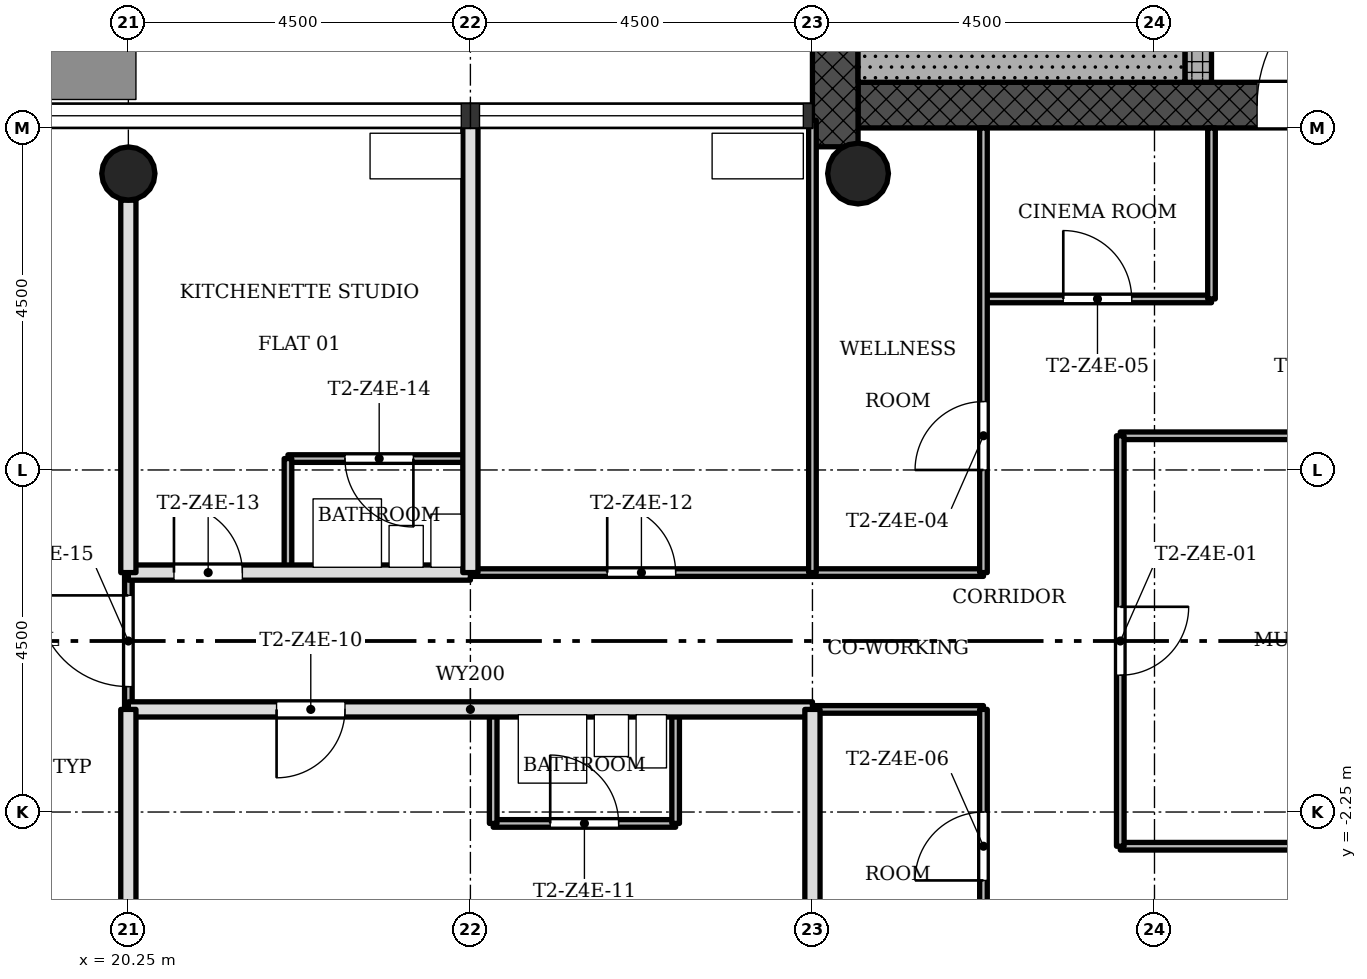
"""IFC4 building model, lengths in metres.
Left out: names, types, materials, properties, quantities, classifications, styles, units other than length and angle.
Written with IfcOpenShell. Run it as: python <this file> out.ifc"""

import sys

from ifc_helpers import new_model, si_unit, direction, frame, frame_2d, origin, origin_2d, place, context, subcontext, project, spatial, rectangle, hollow_circle, extrude, element, fill, save


model = new_model("IFC4")
c1 = context("Model", 3, precision=1e-05, world=origin(), true_north=direction((0.0, 1.0)))
c2 = subcontext(c1, "Body", "Model", "MODEL_VIEW")
j1 = project(units=[si_unit("LENGTHUNIT", "METRE"), si_unit("PLANEANGLEUNIT", "RADIAN")], contexts=[c1])
p1 = place(None, origin())
s1 = spatial("IfcSite", under=j1, at=p1, CompositionType="ELEMENT")
p2 = place(p1, origin())
s2 = spatial("IfcBuilding", under=s1, at=p2, CompositionType="ELEMENT")
p3 = place(p2, frame((0.0, 0.0, 209.6)))
s3 = spatial("IfcBuildingStorey", under=s2, at=p3, CompositionType="ELEMENT", Elevation=209.6)
p4 = place(p3, frame((29.85, 7.05, 0.0), z_axis=(0.0, 0.0, 1.0), x_axis=(1.0, 0.0, 0.0)))
e1 = element("IfcWall", 1, at=p4, inside=s3, PredefinedType="SHEAR", context=c2, shape_type="SweptSolid", body=[
    extrude(rectangle(XDim=12.9, YDim=0.6, at=frame_2d((6.45, 0.0))), origin(), (0.0, 0.0, 1.0), 3.4),
])
p5 = place(p4, frame((5.25, 0.0, 0.0)))
e2 = element("IfcOpeningElement", 2, at=p5, cuts=e1, PredefinedType="OPENING", context=c2, shape_type="SweptSolid", body=[
    extrude(rectangle(XDim=1.8, YDim=2.1, at=frame_2d((0.9, 1.05))), frame((0.0, 0.31, 0.0), z_axis=(0.0, -1.0, 0.0), x_axis=(1.0, 0.0, 0.0)), (0.0, 0.0, 1.0), 0.62),
])
p6 = place(p3, frame((29.55, 15.15, 0.0), z_axis=(0.0, 0.0, 1.0), x_axis=(0.0, -1.0, 0.0)))
e3 = element("IfcWall", 3, at=p6, inside=s3, PredefinedType="SHEAR", context=c2, shape_type="SweptSolid", body=[
    extrude(rectangle(XDim=8.648, YDim=0.6, at=frame_2d((4.324, 0.0))), origin(), (0.0, 0.0, 1.0), 3.4),
])
p7 = place(p3, frame((34.325, 7.35, 0.0), z_axis=(0.0, 0.0, 1.0), x_axis=(0.0, 1.0, 0.0)))
e4 = element("IfcWall", 4, at=p7, inside=s3, PredefinedType="SHEAR", context=c2, shape_type="SweptSolid", body=[
    extrude(rectangle(XDim=7.8, YDim=0.35, at=frame_2d((3.9, 0.0))), origin(), (0.0, 0.0, 1.0), 3.4),
])
p8 = place(p7, frame((1.05, 0.0, 0.0)))
e5 = element("IfcOpeningElement", 5, at=p8, cuts=e4, PredefinedType="OPENING", context=c2, shape_type="SweptSolid", body=[
    extrude(rectangle(XDim=0.9, YDim=2.1, at=frame_2d((0.45, 1.05))), frame((0.0, 0.185, 0.0), z_axis=(0.0, -1.0, 0.0), x_axis=(1.0, 0.0, 0.0)), (0.0, 0.0, 1.0), 0.37),
])
p9 = place(p3, frame((20.25, 6.15, 0.0), z_axis=(0.0, 0.0, 1.0), x_axis=(1.0, 0.0, 0.0)))
e6 = element("IfcColumn", 6, at=p9, inside=s3, PredefinedType="COLUMN", context=c2, shape_type="SweptSolid", body=[
    extrude(hollow_circle(Radius=0.35, WallThickness=0.025, at=origin_2d()), origin(), (0.0, 0.0, 1.0), 3.4),
])
p10 = place(p3, frame((29.85, 6.15, 0.0), z_axis=(0.0, 0.0, 1.0), x_axis=(1.0, 0.0, 0.0)))
e7 = element("IfcColumn", 7, at=p10, inside=s3, PredefinedType="COLUMN", context=c2, shape_type="SweptSolid", body=[
    extrude(hollow_circle(Radius=0.4, WallThickness=0.028, at=origin_2d()), origin(), (0.0, 0.0, 1.0), 3.4),
])
p11 = place(p3, frame((38.7, -2.7, 0.0), z_axis=(0.0, 0.0, 1.0), x_axis=(-1.0, 0.0, 0.0)))
e8 = element("IfcWall", 8, at=p11, inside=s3, PredefinedType="PARTITIONING", context=c2, shape_type="SweptSolid", body=[
    extrude(rectangle(XDim=5.4, YDim=0.1, at=frame_2d((2.7, 0.0))), origin(), (0.0, 0.0, 1.0), 3.0),
])
p12 = place(p3, frame((27.45, -2.4, 0.0), z_axis=(0.0, 0.0, 1.0), x_axis=(-1.0, 0.0, 0.0)))
e9 = element("IfcWall", 9, at=p12, inside=s3, PredefinedType="PARTITIONING", context=c2, shape_type="SweptSolid", body=[
    extrude(rectangle(XDim=2.4, YDim=0.1, at=frame_2d((1.2, 0.0))), origin(), (0.0, 0.0, 1.0), 3.0),
])
p13 = place(p12, frame((0.75, 0.0, 0.0)))
e10 = element("IfcOpeningElement", 10, at=p13, cuts=e9, PredefinedType="OPENING", context=c2, shape_type="SweptSolid", body=[
    extrude(rectangle(XDim=0.9, YDim=2.1, at=frame_2d((0.45, 1.05))), frame((0.0, 0.06, 0.0), z_axis=(0.0, -1.0, 0.0), x_axis=(1.0, 0.0, 0.0)), (0.0, 0.0, 1.0), 0.12),
])
p14 = place(p3, frame((31.5, -0.9, 0.0), z_axis=(0.0, 0.0, 1.0), x_axis=(-1.0, 0.0, 0.0)))
e11 = element("IfcWall", 11, at=p14, inside=s3, PredefinedType="PARTITIONING", context=c2, shape_type="SweptSolid", body=[
    extrude(rectangle(XDim=2.25, YDim=0.1, at=frame_2d((1.125, 0.0))), origin(), (0.0, 0.0, 1.0), 3.0),
])
p15 = place(p3, frame((29.25, -0.9, 0.0), z_axis=(0.0, 0.0, 1.0), x_axis=(-1.0, 0.0, 0.0)))
e12 = element("IfcWall", 12, at=p15, inside=s3, PredefinedType="SOLIDWALL", context=c2, shape_type="SweptSolid", body=[
    extrude(rectangle(XDim=9.0, YDim=0.2, at=frame_2d((4.5, 0.0))), origin(), (0.0, 0.0, 1.0), 3.0),
])
p16 = place(p15, frame((6.15, 0.0, 0.0)))
e13 = element("IfcOpeningElement", 13, at=p16, cuts=e12, PredefinedType="OPENING", context=c2, shape_type="SweptSolid", body=[
    extrude(rectangle(XDim=0.9, YDim=2.1, at=frame_2d((0.45, 1.05))), frame((0.0, 0.11, 0.0), z_axis=(0.0, -1.0, 0.0), x_axis=(1.0, 0.0, 0.0)), (0.0, 0.0, 1.0), 0.22),
])
p17 = place(p3, frame((31.5, 0.9, 0.0), z_axis=(0.0, 0.0, 1.0), x_axis=(-1.0, 0.0, 0.0)))
e14 = element("IfcWall", 14, at=p17, inside=s3, PredefinedType="PARTITIONING", context=c2, shape_type="SweptSolid", body=[
    extrude(rectangle(XDim=6.75, YDim=0.1, at=frame_2d((3.375, 0.0))), origin(), (0.0, 0.0, 1.0), 3.0),
])
p18 = place(p17, frame((4.05, 0.0, 0.0)))
e15 = element("IfcOpeningElement", 15, at=p18, cuts=e14, PredefinedType="OPENING", context=c2, shape_type="SweptSolid", body=[
    extrude(rectangle(XDim=0.9, YDim=2.1, at=frame_2d((0.45, 1.05))), frame((0.0, 0.06, 0.0), z_axis=(0.0, -1.0, 0.0), x_axis=(1.0, 0.0, 0.0)), (0.0, 0.0, 1.0), 0.12),
])
p19 = place(p3, frame((24.75, 0.9, 0.0), z_axis=(0.0, 0.0, 1.0), x_axis=(-1.0, 0.0, 0.0)))
e16 = element("IfcWall", 16, at=p19, inside=s3, PredefinedType="SOLIDWALL", context=c2, shape_type="SweptSolid", body=[
    extrude(rectangle(XDim=4.5, YDim=0.2, at=frame_2d((2.25, 0.0))), origin(), (0.0, 0.0, 1.0), 3.0),
])
p20 = place(p19, frame((3.0, 0.0, 0.0)))
e17 = element("IfcOpeningElement", 17, at=p20, cuts=e16, PredefinedType="OPENING", context=c2, shape_type="SweptSolid", body=[
    extrude(rectangle(XDim=0.9, YDim=2.1, at=frame_2d((0.45, 1.05))), frame((0.0, 0.11, 0.0), z_axis=(0.0, -1.0, 0.0), x_axis=(1.0, 0.0, 0.0)), (0.0, 0.0, 1.0), 0.22),
])
p21 = place(p3, frame((24.75, 2.4, 0.0), z_axis=(0.0, 0.0, 1.0), x_axis=(-1.0, 0.0, 0.0)))
e18 = element("IfcWall", 18, at=p21, inside=s3, PredefinedType="PARTITIONING", context=c2, shape_type="SweptSolid", body=[
    extrude(rectangle(XDim=2.4, YDim=0.1, at=frame_2d((1.2, 0.0))), origin(), (0.0, 0.0, 1.0), 3.0),
])
p22 = place(p21, frame((0.75, 0.0, 0.0)))
e19 = element("IfcOpeningElement", 19, at=p22, cuts=e18, PredefinedType="OPENING", context=c2, shape_type="SweptSolid", body=[
    extrude(rectangle(XDim=0.9, YDim=2.1, at=frame_2d((0.45, 1.05))), frame((0.0, 0.06, 0.0), z_axis=(0.0, -1.0, 0.0), x_axis=(1.0, 0.0, 0.0)), (0.0, 0.0, 1.0), 0.12),
])
p23 = place(p3, frame((38.7, 2.7, 0.0), z_axis=(0.0, 0.0, 1.0), x_axis=(-1.0, 0.0, 0.0)))
e20 = element("IfcWall", 20, at=p23, inside=s3, PredefinedType="PARTITIONING", context=c2, shape_type="SweptSolid", body=[
    extrude(rectangle(XDim=5.4, YDim=0.1, at=frame_2d((2.7, 0.0))), origin(), (0.0, 0.0, 1.0), 3.0),
])
p24 = place(p23, frame((2.25, 0.0, 0.0)))
e21 = element("IfcOpeningElement", 21, at=p24, cuts=e20, PredefinedType="OPENING", context=c2, shape_type="SweptSolid", body=[
    extrude(rectangle(XDim=0.9, YDim=2.1, at=frame_2d((0.45, 1.05))), frame((0.0, 0.06, 0.0), z_axis=(0.0, -1.0, 0.0), x_axis=(1.0, 0.0, 0.0)), (0.0, 0.0, 1.0), 0.12),
])
p25 = place(p3, frame((34.5, 4.5, 0.0), z_axis=(0.0, 0.0, 1.0), x_axis=(-1.0, 0.0, 0.0)))
e22 = element("IfcWall", 22, at=p25, inside=s3, PredefinedType="PARTITIONING", context=c2, shape_type="SweptSolid", body=[
    extrude(rectangle(XDim=3.0, YDim=0.1, at=frame_2d((1.5, 0.0))), origin(), (0.0, 0.0, 1.0), 3.0),
])
p26 = place(p25, frame((1.05, 0.0, 0.0)))
e23 = element("IfcOpeningElement", 23, at=p26, cuts=e22, PredefinedType="OPENING", context=c2, shape_type="SweptSolid", body=[
    extrude(rectangle(XDim=0.9, YDim=2.1, at=frame_2d((0.45, 1.05))), frame((0.0, 0.06, 0.0), z_axis=(0.0, -1.0, 0.0), x_axis=(1.0, 0.0, 0.0)), (0.0, 0.0, 1.0), 0.12),
])
p27 = place(p3, frame((34.5, 4.5, 0.0), z_axis=(0.0, 0.0, 1.0), x_axis=(0.0, 1.0, 0.0)))
e24 = element("IfcWall", 24, at=p27, inside=s3, PredefinedType="PARTITIONING", context=c2, shape_type="SweptSolid", body=[
    extrude(rectangle(XDim=2.25, YDim=0.1, at=frame_2d((1.125, 0.0))), origin(), (0.0, 0.0, 1.0), 3.0),
])
p28 = place(p3, frame((33.3, -2.7, 0.0), z_axis=(0.0, 0.0, 1.0), x_axis=(0.0, 1.0, 0.0)))
e25 = element("IfcWall", 25, at=p28, inside=s3, PredefinedType="PARTITIONING", context=c2, shape_type="SweptSolid", body=[
    extrude(rectangle(XDim=5.4, YDim=0.1, at=frame_2d((2.7, 0.0))), origin(), (0.0, 0.0, 1.0), 3.0),
])
p29 = place(p28, frame((2.25, 0.0, 0.0)))
e26 = element("IfcOpeningElement", 26, at=p29, cuts=e25, PredefinedType="OPENING", context=c2, shape_type="SweptSolid", body=[
    extrude(rectangle(XDim=0.9, YDim=2.1, at=frame_2d((0.45, 1.05))), frame((0.0, 0.06, 0.0), z_axis=(0.0, -1.0, 0.0), x_axis=(1.0, 0.0, 0.0)), (0.0, 0.0, 1.0), 0.12),
])
p30 = place(p3, frame((31.5, -4.5, 0.0), z_axis=(0.0, 0.0, 1.0), x_axis=(0.0, 1.0, 0.0)))
e27 = element("IfcWall", 27, at=p30, inside=s3, PredefinedType="PARTITIONING", context=c2, shape_type="SweptSolid", body=[
    extrude(rectangle(XDim=3.6, YDim=0.1, at=frame_2d((1.8, 0.0))), origin(), (0.0, 0.0, 1.0), 3.0),
])
p31 = place(p30, frame((1.35, 0.0, 0.0)))
e28 = element("IfcOpeningElement", 28, at=p31, cuts=e27, PredefinedType="OPENING", context=c2, shape_type="SweptSolid", body=[
    extrude(rectangle(XDim=0.9, YDim=2.1, at=frame_2d((0.45, 1.05))), frame((0.0, 0.06, 0.0), z_axis=(0.0, -1.0, 0.0), x_axis=(1.0, 0.0, 0.0)), (0.0, 0.0, 1.0), 0.12),
])
p32 = place(p3, frame((31.5, 0.9, 0.0), z_axis=(0.0, 0.0, 1.0), x_axis=(0.0, 1.0, 0.0)))
e29 = element("IfcWall", 29, at=p32, inside=s3, PredefinedType="PARTITIONING", context=c2, shape_type="SweptSolid", body=[
    extrude(rectangle(XDim=5.85, YDim=0.1, at=frame_2d((2.925, 0.0))), origin(), (0.0, 0.0, 1.0), 3.0),
])
p33 = place(p32, frame((1.35, 0.0, 0.0)))
e30 = element("IfcOpeningElement", 30, at=p33, cuts=e29, PredefinedType="OPENING", context=c2, shape_type="SweptSolid", body=[
    extrude(rectangle(XDim=0.9, YDim=2.1, at=frame_2d((0.45, 1.05))), frame((0.0, 0.06, 0.0), z_axis=(0.0, -1.0, 0.0), x_axis=(1.0, 0.0, 0.0)), (0.0, 0.0, 1.0), 0.12),
])
p34 = place(p3, frame((29.25, 0.9, 0.0), z_axis=(0.0, 0.0, 1.0), x_axis=(0.0, 1.0, 0.0)))
e31 = element("IfcWall", 31, at=p34, inside=s3, PredefinedType="PARTITIONING", context=c2, shape_type="SweptSolid", body=[
    extrude(rectangle(XDim=5.95, YDim=0.1, at=frame_2d((2.975, 0.0))), origin(), (0.0, 0.0, 1.0), 3.0),
])
p35 = place(p3, frame((29.25, -6.85, 0.0), z_axis=(0.0, 0.0, 1.0), x_axis=(0.0, 1.0, 0.0)))
e32 = element("IfcWall", 32, at=p35, inside=s3, PredefinedType="SOLIDWALL", context=c2, shape_type="SweptSolid", body=[
    extrude(rectangle(XDim=5.95, YDim=0.2, at=frame_2d((2.975, 0.0))), origin(), (0.0, 0.0, 1.0), 3.0),
])
for number, where, z_axis, x_axis in (
    (33, (27.45, -2.4, 0.0), (0.0, 0.0, 1.0), (0.0, 1.0, 0.0)),
    (34, (25.05, -2.4, 0.0), (0.0, 0.0, 1.0), (0.0, 1.0, 0.0)),
):
    element("IfcWall", number, at=place(p3, frame(where, z_axis=z_axis, x_axis=x_axis)), inside=s3, PredefinedType="PARTITIONING", context=c2, shape_type="SweptSolid", body=[
        extrude(rectangle(XDim=1.5, YDim=0.1, at=frame_2d((0.75, 0.0))), origin(), (0.0, 0.0, 1.0), 3.0),
    ])
p36 = place(p3, frame((24.75, 0.9, 0.0), z_axis=(0.0, 0.0, 1.0), x_axis=(0.0, 1.0, 0.0)))
e35 = element("IfcWall", 35, at=p36, inside=s3, PredefinedType="SOLIDWALL", context=c2, shape_type="SweptSolid", body=[
    extrude(rectangle(XDim=5.95, YDim=0.2, at=frame_2d((2.975, 0.0))), origin(), (0.0, 0.0, 1.0), 3.0),
])
p37 = place(p3, frame((22.35, 0.9, 0.0), z_axis=(0.0, 0.0, 1.0), x_axis=(0.0, 1.0, 0.0)))
e36 = element("IfcWall", 36, at=p37, inside=s3, PredefinedType="PARTITIONING", context=c2, shape_type="SweptSolid", body=[
    extrude(rectangle(XDim=1.5, YDim=0.1, at=frame_2d((0.75, 0.0))), origin(), (0.0, 0.0, 1.0), 3.0),
])
p38 = place(p3, frame((20.25, -0.9, 0.0), z_axis=(0.0, 0.0, 1.0), x_axis=(0.0, 1.0, 0.0)))
e37 = element("IfcWall", 37, at=p38, inside=s3, PredefinedType="PARTITIONING", context=c2, shape_type="SweptSolid", body=[
    extrude(rectangle(XDim=1.8, YDim=0.1, at=frame_2d((0.9, 0.0))), origin(), (0.0, 0.0, 1.0), 3.0),
])
p39 = place(p38, frame((0.3, 0.0, 0.0)))
e38 = element("IfcOpeningElement", 38, at=p39, cuts=e37, PredefinedType="OPENING", context=c2, shape_type="SweptSolid", body=[
    extrude(rectangle(XDim=1.2, YDim=2.1, at=frame_2d((0.6, 1.05))), frame((0.0, 0.06, 0.0), z_axis=(0.0, -1.0, 0.0), x_axis=(1.0, 0.0, 0.0)), (0.0, 0.0, 1.0), 0.12),
])
for number, where, z_axis, x_axis in (
    (39, (20.25, -5.8, 0.0), (0.0, 0.0, 1.0), (0.0, 1.0, 0.0)),
    (40, (20.25, 0.9, 0.0), (0.0, 0.0, 1.0), (0.0, 1.0, 0.0)),
):
    element("IfcWall", number, at=place(p3, frame(where, z_axis=z_axis, x_axis=x_axis)), inside=s3, PredefinedType="SOLIDWALL", context=c2, shape_type="SweptSolid", body=[
        extrude(rectangle(XDim=4.9, YDim=0.2, at=frame_2d((2.45, 0.0))), origin(), (0.0, 0.0, 1.0), 3.0),
    ])
p40 = place(p3, frame((34.15, 7.65, 0.0), z_axis=(0.0, 0.0, 1.0), x_axis=(-1.0, 0.0, 0.0)))
e41 = element("IfcWall", 41, at=p40, inside=s3, PredefinedType="SHEAR", context=c2, shape_type="SweptSolid", body=[
    extrude(rectangle(XDim=4.3, YDim=0.6, at=frame_2d((2.15, 0.0))), origin(), (0.0, 0.0, 1.0), 3.4),
])
p41 = place(p29, origin())
e42 = element("IfcDoor", 42, at=p41, inside=s3, OperationType="SINGLE_SWING_RIGHT", PredefinedType="DOOR", context=c2, shape_type="SweptSolid", body=[
    extrude(rectangle(XDim=0.9, YDim=2.1, at=frame_2d((0.45, 1.05))), frame((0.0, 0.025, 0.0), z_axis=(0.0, -1.0, 0.0), x_axis=(1.0, 0.0, 0.0)), (0.0, 0.0, 1.0), 0.05),
])
fill(e26, e42)
p42 = place(p33, origin())
e43 = element("IfcDoor", 43, at=p42, inside=s3, OperationType="SINGLE_SWING_RIGHT", PredefinedType="DOOR", context=c2, shape_type="SweptSolid", body=[
    extrude(rectangle(XDim=0.9, YDim=2.1, at=frame_2d((0.45, 1.05))), frame((0.0, 0.025, 0.0), z_axis=(0.0, -1.0, 0.0), x_axis=(1.0, 0.0, 0.0)), (0.0, 0.0, 1.0), 0.05),
])
fill(e30, e43)
p43 = place(p26, origin())
e44 = element("IfcDoor", 44, at=p43, inside=s3, OperationType="SINGLE_SWING_RIGHT", PredefinedType="DOOR", context=c2, shape_type="SweptSolid", body=[
    extrude(rectangle(XDim=0.9, YDim=2.1, at=frame_2d((0.45, 1.05))), frame((0.0, 0.025, 0.0), z_axis=(0.0, -1.0, 0.0), x_axis=(1.0, 0.0, 0.0)), (0.0, 0.0, 1.0), 0.05),
])
fill(e23, e44)
p44 = place(p31, origin())
e45 = element("IfcDoor", 45, at=p44, inside=s3, OperationType="SINGLE_SWING_RIGHT", PredefinedType="DOOR", context=c2, shape_type="SweptSolid", body=[
    extrude(rectangle(XDim=0.9, YDim=2.1, at=frame_2d((0.45, 1.05))), frame((0.0, 0.025, 0.0), z_axis=(0.0, -1.0, 0.0), x_axis=(1.0, 0.0, 0.0)), (0.0, 0.0, 1.0), 0.05),
])
fill(e28, e45)
p45 = place(p16, origin())
e46 = element("IfcDoor", 46, at=p45, inside=s3, OperationType="SINGLE_SWING_LEFT", PredefinedType="DOOR", context=c2, shape_type="SweptSolid", body=[
    extrude(rectangle(XDim=0.9, YDim=2.1, at=frame_2d((0.45, 1.05))), frame((0.0, 0.025, 0.0), z_axis=(0.0, -1.0, 0.0), x_axis=(1.0, 0.0, 0.0)), (0.0, 0.0, 1.0), 0.05),
])
fill(e13, e46)
p46 = place(p13, origin())
e47 = element("IfcDoor", 47, at=p46, inside=s3, OperationType="SINGLE_SWING_RIGHT", PredefinedType="DOOR", context=c2, shape_type="SweptSolid", body=[
    extrude(rectangle(XDim=0.9, YDim=2.1, at=frame_2d((0.45, 1.05))), frame((0.0, 0.025, 0.0), z_axis=(0.0, -1.0, 0.0), x_axis=(1.0, 0.0, 0.0)), (0.0, 0.0, 1.0), 0.05),
])
fill(e10, e47)
p47 = place(p18, origin())
e48 = element("IfcDoor", 48, at=p47, inside=s3, OperationType="SINGLE_SWING_RIGHT", PredefinedType="DOOR", context=c2, shape_type="SweptSolid", body=[
    extrude(rectangle(XDim=0.9, YDim=2.1, at=frame_2d((0.45, 1.05))), frame((0.0, 0.025, 0.0), z_axis=(0.0, -1.0, 0.0), x_axis=(1.0, 0.0, 0.0)), (0.0, 0.0, 1.0), 0.05),
])
fill(e15, e48)
p48 = place(p20, origin())
e49 = element("IfcDoor", 49, at=p48, inside=s3, OperationType="SINGLE_SWING_RIGHT", PredefinedType="DOOR", context=c2, shape_type="SweptSolid", body=[
    extrude(rectangle(XDim=0.9, YDim=2.1, at=frame_2d((0.45, 1.05))), frame((0.0, 0.025, 0.0), z_axis=(0.0, -1.0, 0.0), x_axis=(1.0, 0.0, 0.0)), (0.0, 0.0, 1.0), 0.05),
])
fill(e17, e49)
p49 = place(p22, origin())
e50 = element("IfcDoor", 50, at=p49, inside=s3, OperationType="SINGLE_SWING_RIGHT", PredefinedType="DOOR", context=c2, shape_type="SweptSolid", body=[
    extrude(rectangle(XDim=0.9, YDim=2.1, at=frame_2d((0.45, 1.05))), frame((0.0, 0.025, 0.0), z_axis=(0.0, -1.0, 0.0), x_axis=(1.0, 0.0, 0.0)), (0.0, 0.0, 1.0), 0.05),
])
fill(e19, e50)
p50 = place(p39, origin())
e51 = element("IfcDoor", 51, at=p50, inside=s3, OperationType="SINGLE_SWING_LEFT", PredefinedType="DOOR", context=c2, shape_type="SweptSolid", body=[
    extrude(rectangle(XDim=1.2, YDim=2.1, at=frame_2d((0.6, 1.05))), frame((0.0, 0.025, 0.0), z_axis=(0.0, -1.0, 0.0), x_axis=(1.0, 0.0, 0.0)), (0.0, 0.0, 1.0), 0.05),
])
fill(e38, e51)
p51 = place(p5, origin())
e52 = element("IfcDoor", 52, at=p51, inside=s3, OperationType="SINGLE_SWING_LEFT", PredefinedType="DOOR", context=c2, shape_type="SweptSolid", body=[
    extrude(rectangle(XDim=1.8, YDim=2.1, at=frame_2d((0.9, 1.05))), frame((0.0, 0.025, 0.0), z_axis=(0.0, -1.0, 0.0), x_axis=(1.0, 0.0, 0.0)), (0.0, 0.0, 1.0), 0.05),
])
fill(e2, e52)
save(model, sys.argv[1])
